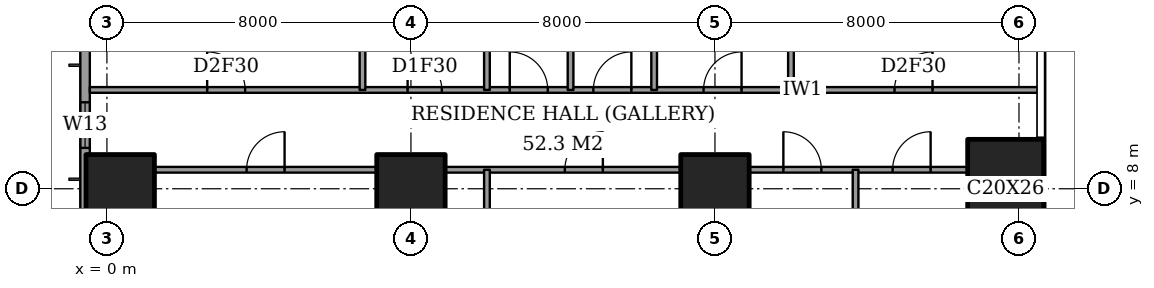
"""IFC4 building model, lengths in metres.
Left out: names, types, materials, properties, quantities, classifications, styles, units other than length and angle.
Written with IfcOpenShell. Run it as: python <this file> out.ifc"""

import sys

from ifc_helpers import new_model, si_unit, direction, frame, frame_2d, origin, origin_2d, place, context, subcontext, project, spatial, rectangle, extrude, element, fill, save


model = new_model("IFC4")
c1 = context("Model", 3, precision=1e-05, world=origin(), true_north=direction((0.0, 1.0)))
c2 = subcontext(c1, "Body", "Model", "MODEL_VIEW")
j1 = project(units=[si_unit("LENGTHUNIT", "METRE"), si_unit("PLANEANGLEUNIT", "RADIAN")], contexts=[c1])
p1 = place(None, origin())
s1 = spatial("IfcSite", under=j1, at=p1, CompositionType="ELEMENT")
p2 = place(p1, origin())
s2 = spatial("IfcBuilding", under=s1, at=p2, CompositionType="ELEMENT")
p3 = place(p2, frame((0.0, 0.0, 203.8)))
s3 = spatial("IfcBuildingStorey", under=s2, at=p3, CompositionType="ELEMENT", Elevation=203.8)
for number, where, z_axis, x_axis in (
    (1, (0.35, 8.0, 0.0), (0.0, 0.0, 1.0), (1.0, 0.0, 0.0)),
    (2, (8.0, 8.0, 0.0), (0.0, 0.0, 1.0), (1.0, 0.0, 0.0)),
    (3, (16.0, 8.0, 0.0), (0.0, 0.0, 1.0), (1.0, 0.0, 0.0)),
):
    element("IfcColumn", number, at=place(p3, frame(where, z_axis=z_axis, x_axis=x_axis)), inside=s3, PredefinedType="COLUMN", context=c2, shape_type="SweptSolid", body=[
        extrude(rectangle(XDim=1.8, YDim=1.8, at=origin_2d()), origin(), (0.0, 0.0, 1.0), 3.6),
    ])
p4 = place(p3, frame((23.65, 8.0, 0.0), z_axis=(0.0, 0.0, 1.0), x_axis=(1.0, 0.0, 0.0)))
e4 = element("IfcColumn", 4, at=p4, inside=s3, PredefinedType="COLUMN", context=c2, shape_type="SweptSolid", body=[
    extrude(rectangle(XDim=2.0, YDim=2.6, at=origin_2d()), origin(), (0.0, 0.0, 1.0), 3.6),
])
p5 = place(p3, frame((-0.575, 44.825, 0.0), z_axis=(0.0, 0.0, 1.0), x_axis=(0.0, -1.0, 0.0)))
e5 = element("IfcWall", 5, at=p5, inside=s3, PredefinedType="SOLIDWALL", context=c2, shape_type="SweptSolid", body=[
    extrude(rectangle(XDim=41.65, YDim=0.25, at=frame_2d((20.825, 0.0))), origin(), (0.0, 0.0, 1.0), 3.6),
])
p6 = place(p5, frame((0.825, 0.0, 0.2)))
e6 = element("IfcOpeningElement", 6, at=p6, cuts=e5, PredefinedType="OPENING", context=c2, shape_type="SweptSolid", body=[
    extrude(rectangle(XDim=2.4, YDim=2.4, at=frame_2d((1.2, 1.2))), frame((0.0, 0.135, 0.0), z_axis=(0.0, -1.0, 0.0), x_axis=(1.0, 0.0, 0.0)), (0.0, 0.0, 1.0), 0.27),
])
p7 = place(p5, frame((6.075, 0.0, 0.2)))
e7 = element("IfcOpeningElement", 7, at=p7, cuts=e5, PredefinedType="OPENING", context=c2, shape_type="SweptSolid", body=[
    extrude(rectangle(XDim=1.2, YDim=2.4, at=frame_2d((0.6, 1.2))), frame((0.0, 0.135, 0.0), z_axis=(0.0, -1.0, 0.0), x_axis=(1.0, 0.0, 0.0)), (0.0, 0.0, 1.0), 0.27),
])
p8 = place(p5, frame((8.575, 0.0, 0.2)))
e8 = element("IfcOpeningElement", 8, at=p8, cuts=e5, PredefinedType="OPENING", context=c2, shape_type="SweptSolid", body=[
    extrude(rectangle(XDim=2.4, YDim=2.4, at=frame_2d((1.2, 1.2))), frame((0.0, 0.135, 0.0), z_axis=(0.0, -1.0, 0.0), x_axis=(1.0, 0.0, 0.0)), (0.0, 0.0, 1.0), 0.27),
])
p9 = place(p5, frame((15.675, 0.0, 0.2)))
e9 = element("IfcOpeningElement", 9, at=p9, cuts=e5, PredefinedType="OPENING", context=c2, shape_type="SweptSolid", body=[
    extrude(rectangle(XDim=2.4, YDim=2.4, at=frame_2d((1.2, 1.2))), frame((0.0, 0.135, 0.0), z_axis=(0.0, -1.0, 0.0), x_axis=(1.0, 0.0, 0.0)), (0.0, 0.0, 1.0), 0.27),
])
p10 = place(p5, frame((23.575, 0.0, 0.2)))
e10 = element("IfcOpeningElement", 10, at=p10, cuts=e5, PredefinedType="OPENING", context=c2, shape_type="SweptSolid", body=[
    extrude(rectangle(XDim=2.4, YDim=2.4, at=frame_2d((1.2, 1.2))), frame((0.0, 0.135, 0.0), z_axis=(0.0, -1.0, 0.0), x_axis=(1.0, 0.0, 0.0)), (0.0, 0.0, 1.0), 0.27),
])
p11 = place(p5, frame((30.775, 0.0, 0.2)))
e11 = element("IfcOpeningElement", 11, at=p11, cuts=e5, PredefinedType="OPENING", context=c2, shape_type="SweptSolid", body=[
    extrude(rectangle(XDim=2.4, YDim=2.4, at=frame_2d((1.2, 1.2))), frame((0.0, 0.135, 0.0), z_axis=(0.0, -1.0, 0.0), x_axis=(1.0, 0.0, 0.0)), (0.0, 0.0, 1.0), 0.27),
])
p12 = place(p5, frame((34.55, 0.0, 0.2)))
e12 = element("IfcOpeningElement", 12, at=p12, cuts=e5, PredefinedType="OPENING", context=c2, shape_type="SweptSolid", body=[
    extrude(rectangle(XDim=1.2, YDim=2.4, at=frame_2d((0.6, 1.2))), frame((0.0, 0.135, 0.0), z_axis=(0.0, -1.0, 0.0), x_axis=(1.0, 0.0, 0.0)), (0.0, 0.0, 1.0), 0.27),
])
p13 = place(p5, frame((38.425, 0.0, 0.2)))
e13 = element("IfcOpeningElement", 13, at=p13, cuts=e5, PredefinedType="OPENING", context=c2, shape_type="SweptSolid", body=[
    extrude(rectangle(XDim=2.4, YDim=2.4, at=frame_2d((1.2, 1.2))), frame((0.0, 0.135, 0.0), z_axis=(0.0, -1.0, 0.0), x_axis=(1.0, 0.0, 0.0)), (0.0, 0.0, 1.0), 0.27),
])
p14 = place(p3, frame((1.25, 8.5, 0.0), z_axis=(0.0, 0.0, 1.0), x_axis=(1.0, 0.0, 0.0)))
e14 = element("IfcWall", 14, at=p14, inside=s3, PredefinedType="PARTITIONING", context=c2, shape_type="SweptSolid", body=[
    extrude(rectangle(XDim=5.85, YDim=0.15, at=frame_2d((2.925, 0.0))), origin(), (0.0, 0.0, 1.0), 3.35),
])
p15 = place(p14, frame((2.425, 0.0, 0.0)))
e15 = element("IfcOpeningElement", 15, at=p15, cuts=e14, PredefinedType="OPENING", context=c2, shape_type="SweptSolid", body=[
    extrude(rectangle(XDim=1.0, YDim=2.1, at=frame_2d((0.5, 1.05))), frame((0.0, 0.085, 0.0), z_axis=(0.0, -1.0, 0.0), x_axis=(1.0, 0.0, 0.0)), (0.0, 0.0, 1.0), 0.17),
])
p16 = place(p3, frame((8.9, 8.5, 0.0), z_axis=(0.0, 0.0, 1.0), x_axis=(1.0, 0.0, 0.0)))
e16 = element("IfcWall", 16, at=p16, inside=s3, PredefinedType="PARTITIONING", context=c2, shape_type="SweptSolid", body=[
    extrude(rectangle(XDim=6.2, YDim=0.15, at=frame_2d((3.1, 0.0))), origin(), (0.0, 0.0, 1.0), 3.35),
])
p17 = place(p16, frame((3.15, 0.0, 0.0)))
e17 = element("IfcOpeningElement", 17, at=p17, cuts=e16, PredefinedType="OPENING", context=c2, shape_type="SweptSolid", body=[
    extrude(rectangle(XDim=1.0, YDim=2.1, at=frame_2d((0.5, 1.05))), frame((0.0, 0.085, 0.0), z_axis=(0.0, -1.0, 0.0), x_axis=(1.0, 0.0, 0.0)), (0.0, 0.0, 1.0), 0.17),
])
p18 = place(p3, frame((16.9, 8.5, 0.0), z_axis=(0.0, 0.0, 1.0), x_axis=(1.0, 0.0, 0.0)))
e18 = element("IfcWall", 18, at=p18, inside=s3, PredefinedType="PARTITIONING", context=c2, shape_type="SweptSolid", body=[
    extrude(rectangle(XDim=5.75, YDim=0.15, at=frame_2d((2.875, 0.0))), origin(), (0.0, 0.0, 1.0), 3.35),
])
p19 = place(p18, frame((0.9, 0.0, 0.0)))
e19 = element("IfcOpeningElement", 19, at=p19, cuts=e18, PredefinedType="OPENING", context=c2, shape_type="SweptSolid", body=[
    extrude(rectangle(XDim=1.0, YDim=2.1, at=frame_2d((0.5, 1.05))), frame((0.0, 0.085, 0.0), z_axis=(0.0, -1.0, 0.0), x_axis=(1.0, 0.0, 0.0)), (0.0, 0.0, 1.0), 0.17),
])
p20 = place(p18, frame((3.775, 0.0, 0.0)))
e20 = element("IfcOpeningElement", 20, at=p20, cuts=e18, PredefinedType="OPENING", context=c2, shape_type="SweptSolid", body=[
    extrude(rectangle(XDim=1.0, YDim=2.1, at=frame_2d((0.5, 1.05))), frame((0.0, 0.085, 0.0), z_axis=(0.0, -1.0, 0.0), x_axis=(1.0, 0.0, 0.0)), (0.0, 0.0, 1.0), 0.17),
])
p21 = place(p3, frame((-0.45, 10.6, 0.0), z_axis=(0.0, 0.0, 1.0), x_axis=(1.0, 0.0, 0.0)))
e21 = element("IfcWall", 21, at=p21, inside=s3, PredefinedType="PARTITIONING", context=c2, shape_type="SweptSolid", body=[
    extrude(rectangle(XDim=25.011, YDim=0.15, at=frame_2d((12.505, 0.0))), origin(), (0.0, 0.0, 1.0), 3.35),
])
p22 = place(p21, frame((13.25, 0.0, 0.0)))
e22 = element("IfcOpeningElement", 22, at=p22, cuts=e21, PredefinedType="OPENING", context=c2, shape_type="SweptSolid", body=[
    extrude(rectangle(XDim=1.0, YDim=2.1, at=frame_2d((0.5, 1.05))), frame((0.0, 0.085, 0.0), z_axis=(0.0, -1.0, 0.0), x_axis=(1.0, 0.0, 0.0)), (0.0, 0.0, 1.0), 0.17),
])
p23 = place(p21, frame((3.087, 0.0, 0.0)))
e23 = element("IfcOpeningElement", 23, at=p23, cuts=e21, PredefinedType="OPENING", context=c2, shape_type="SweptSolid", body=[
    extrude(rectangle(XDim=1.0, YDim=2.1, at=frame_2d((0.5, 1.05))), frame((0.0, 0.085, 0.0), z_axis=(0.0, -1.0, 0.0), x_axis=(1.0, 0.0, 0.0)), (0.0, 0.0, 1.0), 0.17),
])
p24 = place(p21, frame((8.363, 0.0, 0.0)))
e24 = element("IfcOpeningElement", 24, at=p24, cuts=e21, PredefinedType="OPENING", context=c2, shape_type="SweptSolid", body=[
    extrude(rectangle(XDim=0.9, YDim=2.1, at=frame_2d((0.45, 1.05))), frame((0.0, 0.085, 0.0), z_axis=(0.0, -1.0, 0.0), x_axis=(1.0, 0.0, 0.0)), (0.0, 0.0, 1.0), 0.17),
])
p25 = place(p21, frame((11.05, 0.0, 0.0)))
e25 = element("IfcOpeningElement", 25, at=p25, cuts=e21, PredefinedType="OPENING", context=c2, shape_type="SweptSolid", body=[
    extrude(rectangle(XDim=1.0, YDim=2.1, at=frame_2d((0.5, 1.05))), frame((0.0, 0.085, 0.0), z_axis=(0.0, -1.0, 0.0), x_axis=(1.0, 0.0, 0.0)), (0.0, 0.0, 1.0), 0.17),
])
p26 = place(p21, frame((16.15, 0.0, 0.0)))
e26 = element("IfcOpeningElement", 26, at=p26, cuts=e21, PredefinedType="OPENING", context=c2, shape_type="SweptSolid", body=[
    extrude(rectangle(XDim=1.0, YDim=2.1, at=frame_2d((0.5, 1.05))), frame((0.0, 0.085, 0.0), z_axis=(0.0, -1.0, 0.0), x_axis=(1.0, 0.0, 0.0)), (0.0, 0.0, 1.0), 0.17),
])
p27 = place(p21, frame((21.175, 0.0, 0.0)))
e27 = element("IfcOpeningElement", 27, at=p27, cuts=e21, PredefinedType="OPENING", context=c2, shape_type="SweptSolid", body=[
    extrude(rectangle(XDim=1.0, YDim=2.1, at=frame_2d((0.5, 1.05))), frame((0.0, 0.085, 0.0), z_axis=(0.0, -1.0, 0.0), x_axis=(1.0, 0.0, 0.0)), (0.0, 0.0, 1.0), 0.17),
])
p28 = place(p3, frame((6.725, 10.6, 0.0), z_axis=(0.0, 0.0, 1.0), x_axis=(0.0, 1.0, 0.0)))
e28 = element("IfcWall", 28, at=p28, inside=s3, PredefinedType="PARTITIONING", context=c2, shape_type="SweptSolid", body=[
    extrude(rectangle(XDim=4.2, YDim=0.15, at=frame_2d((2.1, 0.0))), origin(), (0.0, 0.0, 1.0), 3.35),
])
p29 = place(p3, frame((10.0, -0.45, 0.0), z_axis=(0.0, 0.0, 1.0), x_axis=(0.0, 1.0, 0.0)))
e29 = element("IfcWall", 29, at=p29, inside=s3, PredefinedType="PARTITIONING", context=c2, shape_type="SweptSolid", body=[
    extrude(rectangle(XDim=8.95, YDim=0.15, at=frame_2d((4.475, 0.0))), origin(), (0.0, 0.0, 1.0), 3.35),
])
p30 = place(p3, frame((10.0, 10.6, 0.0), z_axis=(0.0, 0.0, 1.0), x_axis=(0.0, 1.0, 0.0)))
e30 = element("IfcWall", 30, at=p30, inside=s3, PredefinedType="PARTITIONING", context=c2, shape_type="SweptSolid", body=[
    extrude(rectangle(XDim=11.0, YDim=0.15, at=frame_2d((5.5, 0.0))), origin(), (0.0, 0.0, 1.0), 3.35),
])
p31 = place(p30, frame((8.2, 0.0, 0.0)))
e31 = element("IfcOpeningElement", 31, at=p31, cuts=e30, PredefinedType="OPENING", context=c2, shape_type="SweptSolid", body=[
    extrude(rectangle(XDim=1.0, YDim=2.1, at=frame_2d((0.5, 1.05))), frame((0.0, 0.085, 0.0), z_axis=(0.0, -1.0, 0.0), x_axis=(1.0, 0.0, 0.0)), (0.0, 0.0, 1.0), 0.17),
])
for number, where, z_axis, x_axis in (
    (32, (12.2, 10.6, 0.0), (0.0, 0.0, 1.0), (0.0, 1.0, 0.0)),
    (33, (14.4, 10.6, 0.0), (0.0, 0.0, 1.0), (0.0, 1.0, 0.0)),
    (34, (18.0, 10.6, 0.0), (0.0, 0.0, 1.0), (0.0, 1.0, 0.0)),
):
    element("IfcWall", number, at=place(p3, frame(where, z_axis=z_axis, x_axis=x_axis)), inside=s3, PredefinedType="PARTITIONING", context=c2, shape_type="SweptSolid", body=[
        extrude(rectangle(XDim=6.4, YDim=0.15, at=frame_2d((3.2, 0.0))), origin(), (0.0, 0.0, 1.0), 3.35),
    ])
p32 = place(p3, frame((19.7, -0.45, 0.0), z_axis=(0.0, 0.0, 1.0), x_axis=(0.0, 1.0, 0.0)))
e35 = element("IfcWall", 35, at=p32, inside=s3, PredefinedType="PARTITIONING", context=c2, shape_type="SweptSolid", body=[
    extrude(rectangle(XDim=8.95, YDim=0.15, at=frame_2d((4.475, 0.0))), origin(), (0.0, 0.0, 1.0), 3.35),
])
p33 = place(p12, origin())
e36 = element("IfcWindow", 36, at=p33, inside=s3, PartitioningType="SINGLE_PANEL", PredefinedType="WINDOW", context=c2, shape_type="SweptSolid", body=[
    extrude(rectangle(XDim=1.2, YDim=2.4, at=frame_2d((0.6, 1.2))), frame((0.0, 0.03, 0.0), z_axis=(0.0, -1.0, 0.0), x_axis=(1.0, 0.0, 0.0)), (0.0, 0.0, 1.0), 0.06),
])
fill(e12, e36)
p34 = place(p15, origin())
e37 = element("IfcDoor", 37, at=p34, inside=s3, OperationType="SINGLE_SWING_LEFT", PredefinedType="DOOR", context=c2, shape_type="SweptSolid", body=[
    extrude(rectangle(XDim=1.0, YDim=2.1, at=frame_2d((0.5, 1.05))), frame((0.0, 0.025, 0.0), z_axis=(0.0, -1.0, 0.0), x_axis=(1.0, 0.0, 0.0)), (0.0, 0.0, 1.0), 0.05),
])
fill(e15, e37)
p35 = place(p17, origin())
e38 = element("IfcDoor", 38, at=p35, inside=s3, OperationType="SINGLE_SWING_LEFT", PredefinedType="DOOR", context=c2, shape_type="SweptSolid", body=[
    extrude(rectangle(XDim=1.0, YDim=2.1, at=frame_2d((0.5, 1.05))), frame((0.0, 0.025, 0.0), z_axis=(0.0, -1.0, 0.0), x_axis=(1.0, 0.0, 0.0)), (0.0, 0.0, 1.0), 0.05),
])
fill(e17, e38)
p36 = place(p19, origin())
e39 = element("IfcDoor", 39, at=p36, inside=s3, OperationType="SINGLE_SWING_RIGHT", PredefinedType="DOOR", context=c2, shape_type="SweptSolid", body=[
    extrude(rectangle(XDim=1.0, YDim=2.1, at=frame_2d((0.5, 1.05))), frame((0.0, 0.025, 0.0), z_axis=(0.0, -1.0, 0.0), x_axis=(1.0, 0.0, 0.0)), (0.0, 0.0, 1.0), 0.05),
])
fill(e19, e39)
p37 = place(p20, origin())
e40 = element("IfcDoor", 40, at=p37, inside=s3, OperationType="SINGLE_SWING_LEFT", PredefinedType="DOOR", context=c2, shape_type="SweptSolid", body=[
    extrude(rectangle(XDim=1.0, YDim=2.1, at=frame_2d((0.5, 1.05))), frame((0.0, 0.025, 0.0), z_axis=(0.0, -1.0, 0.0), x_axis=(1.0, 0.0, 0.0)), (0.0, 0.0, 1.0), 0.05),
])
fill(e20, e40)
p38 = place(p22, origin())
e41 = element("IfcDoor", 41, at=p38, inside=s3, OperationType="SINGLE_SWING_LEFT", PredefinedType="DOOR", context=c2, shape_type="SweptSolid", body=[
    extrude(rectangle(XDim=1.0, YDim=2.1, at=frame_2d((0.5, 1.05))), frame((0.0, 0.025, 0.0), z_axis=(0.0, -1.0, 0.0), x_axis=(1.0, 0.0, 0.0)), (0.0, 0.0, 1.0), 0.05),
])
fill(e22, e41)
p39 = place(p23, origin())
e42 = element("IfcDoor", 42, at=p39, inside=s3, OperationType="SINGLE_SWING_RIGHT", PredefinedType="DOOR", context=c2, shape_type="SweptSolid", body=[
    extrude(rectangle(XDim=1.0, YDim=2.1, at=frame_2d((0.5, 1.05))), frame((0.0, 0.025, 0.0), z_axis=(0.0, -1.0, 0.0), x_axis=(1.0, 0.0, 0.0)), (0.0, 0.0, 1.0), 0.05),
])
fill(e23, e42)
p40 = place(p24, origin())
e43 = element("IfcDoor", 43, at=p40, inside=s3, OperationType="SINGLE_SWING_RIGHT", PredefinedType="DOOR", context=c2, shape_type="SweptSolid", body=[
    extrude(rectangle(XDim=0.9, YDim=2.1, at=frame_2d((0.45, 1.05))), frame((0.0, 0.025, 0.0), z_axis=(0.0, -1.0, 0.0), x_axis=(1.0, 0.0, 0.0)), (0.0, 0.0, 1.0), 0.05),
])
fill(e24, e43)
p41 = place(p25, origin())
e44 = element("IfcDoor", 44, at=p41, inside=s3, OperationType="SINGLE_SWING_RIGHT", PredefinedType="DOOR", context=c2, shape_type="SweptSolid", body=[
    extrude(rectangle(XDim=1.0, YDim=2.1, at=frame_2d((0.5, 1.05))), frame((0.0, 0.025, 0.0), z_axis=(0.0, -1.0, 0.0), x_axis=(1.0, 0.0, 0.0)), (0.0, 0.0, 1.0), 0.05),
])
fill(e25, e44)
p42 = place(p26, origin())
e45 = element("IfcDoor", 45, at=p42, inside=s3, OperationType="SINGLE_SWING_LEFT", PredefinedType="DOOR", context=c2, shape_type="SweptSolid", body=[
    extrude(rectangle(XDim=1.0, YDim=2.1, at=frame_2d((0.5, 1.05))), frame((0.0, 0.025, 0.0), z_axis=(0.0, -1.0, 0.0), x_axis=(1.0, 0.0, 0.0)), (0.0, 0.0, 1.0), 0.05),
])
fill(e26, e45)
p43 = place(p27, origin())
e46 = element("IfcDoor", 46, at=p43, inside=s3, OperationType="SINGLE_SWING_LEFT", PredefinedType="DOOR", context=c2, shape_type="SweptSolid", body=[
    extrude(rectangle(XDim=1.0, YDim=2.1, at=frame_2d((0.5, 1.05))), frame((0.0, 0.025, 0.0), z_axis=(0.0, -1.0, 0.0), x_axis=(1.0, 0.0, 0.0)), (0.0, 0.0, 1.0), 0.05),
])
fill(e27, e46)
save(model, sys.argv[1])
